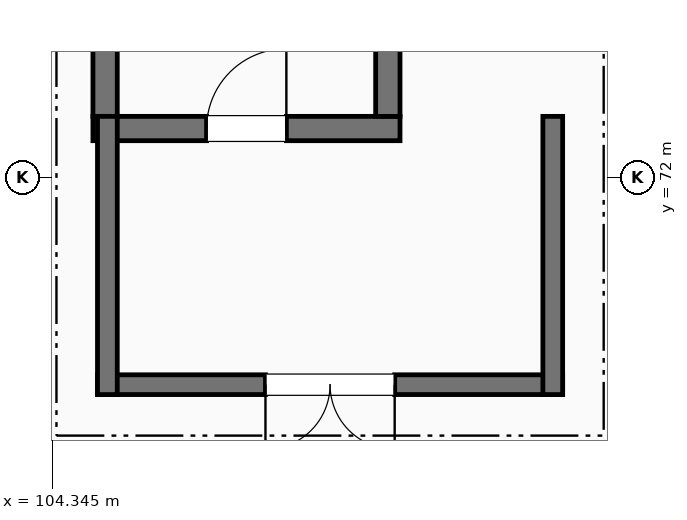
"""IFC4 building model, lengths in metres.
Left out: names, types, materials, properties, quantities, classifications, styles, units other than length and angle.
Written with IfcOpenShell. Run it as: python <this file> out.ifc"""

import sys

from ifc_helpers import new_model, si_unit, direction, frame, frame_2d, origin, place, context, subcontext, project, spatial, rectangle, extrude, element, fill, save


model = new_model("IFC4")
c1 = context("Model", 3, precision=1e-05, world=origin(), true_north=direction((0.0, 1.0)))
c2 = subcontext(c1, "Body", "Model", "MODEL_VIEW")
j1 = project(units=[si_unit("LENGTHUNIT", "METRE"), si_unit("PLANEANGLEUNIT", "RADIAN")], contexts=[c1])
p1 = place(None, origin())
s1 = spatial("IfcSite", under=j1, at=p1, CompositionType="ELEMENT")
p2 = place(p1, origin())
s2 = spatial("IfcBuilding", under=s1, at=p2, CompositionType="ELEMENT")
p3 = place(p2, origin())
s3 = spatial("IfcBuildingStorey", under=s2, at=p3, CompositionType="ELEMENT", Elevation=0.0)
p4 = place(p3, frame((104.88, 72.64, 0.0), z_axis=(0.0, 0.0, 1.0), x_axis=(1.0, 0.0, 0.0)))
e1 = element("IfcWall", 1, at=p4, inside=s3, PredefinedType="SHEAR", context=c2, shape_type="SweptSolid", body=[
    extrude(rectangle(XDim=4.04, YDim=0.32, at=frame_2d((2.02, 0.0))), origin(), (0.0, 0.0, 1.0), 5.4),
])
p5 = place(p4, frame((1.495, 0.0, 0.0)))
e2 = element("IfcOpeningElement", 2, at=p5, cuts=e1, PredefinedType="OPENING", context=c2, shape_type="SweptSolid", body=[
    extrude(rectangle(XDim=1.05, YDim=2.15, at=frame_2d((0.525, 1.075))), frame((0.0, 0.17, 0.0), z_axis=(0.0, -1.0, 0.0), x_axis=(1.0, 0.0, 0.0)), (0.0, 0.0, 1.0), 0.34),
])
for number, where, z_axis, x_axis in (
    (3, (105.04, 72.8, 0.0), (0.0, 0.0, 1.0), (0.0, 1.0, 0.0)),
    (4, (108.76, 72.8, 0.0), (0.0, 0.0, 1.0), (0.0, 1.0, 0.0)),
):
    element("IfcWall", number, at=place(p3, frame(where, z_axis=z_axis, x_axis=x_axis)), inside=s3, PredefinedType="SHEAR", context=c2, shape_type="SweptSolid", body=[
        extrude(rectangle(XDim=8.6, YDim=0.32, at=frame_2d((4.3, 0.0))), origin(), (0.0, 0.0, 1.0), 5.4),
    ])
p6 = place(p3, frame((111.06, 69.27, 0.0), z_axis=(0.0, 0.0, 1.0), x_axis=(-1.0, 0.0, 0.0)))
e5 = element("IfcWall", 5, at=p6, inside=s3, PredefinedType="SHEAR", context=c2, shape_type="SweptSolid", body=[
    extrude(rectangle(XDim=6.12, YDim=0.26, at=frame_2d((3.06, 0.0))), origin(), (0.0, 0.0, 1.0), 5.4),
])
p7 = place(p6, frame((2.21, 0.0, 0.0)))
e6 = element("IfcOpeningElement", 6, at=p7, cuts=e5, PredefinedType="OPENING", context=c2, shape_type="SweptSolid", body=[
    extrude(rectangle(XDim=1.7, YDim=2.2, at=frame_2d((0.85, 1.1))), frame((0.0, 0.14, 0.0), z_axis=(0.0, -1.0, 0.0), x_axis=(1.0, 0.0, 0.0)), (0.0, 0.0, 1.0), 0.28),
])
for number, where, z_axis, x_axis in (
    (7, (105.07, 69.14, 0.0), (0.0, 0.0, 1.0), (0.0, 1.0, 0.0)),
    (8, (110.93, 69.14, 0.0), (0.0, 0.0, 1.0), (0.0, 1.0, 0.0)),
):
    element("IfcWall", number, at=place(p3, frame(where, z_axis=z_axis, x_axis=x_axis)), inside=s3, PredefinedType="SHEAR", context=c2, shape_type="SweptSolid", body=[
        extrude(rectangle(XDim=3.66, YDim=0.26, at=frame_2d((1.83, 0.0))), origin(), (0.0, 0.0, 1.0), 5.4),
    ])
p8 = place(p5, origin())
e9 = element("IfcDoor", 9, at=p8, inside=s3, OperationType="SINGLE_SWING_RIGHT", PredefinedType="DOOR", context=c2, shape_type="SweptSolid", body=[
    extrude(rectangle(XDim=1.05, YDim=2.15, at=frame_2d((0.525, 1.075))), frame((0.0, 0.025, 0.0), z_axis=(0.0, -1.0, 0.0), x_axis=(1.0, 0.0, 0.0)), (0.0, 0.0, 1.0), 0.05),
])
fill(e2, e9)
p9 = place(p7, origin())
e10 = element("IfcDoor", 10, at=p9, inside=s3, OperationType="DOUBLE_DOOR_SINGLE_SWING", PredefinedType="DOOR", context=c2, shape_type="SweptSolid", body=[
    extrude(rectangle(XDim=1.7, YDim=2.2, at=frame_2d((0.85, 1.1))), frame((0.0, 0.025, 0.0), z_axis=(0.0, -1.0, 0.0), x_axis=(1.0, 0.0, 0.0)), (0.0, 0.0, 1.0), 0.05),
])
fill(e6, e10)
save(model, sys.argv[1])
